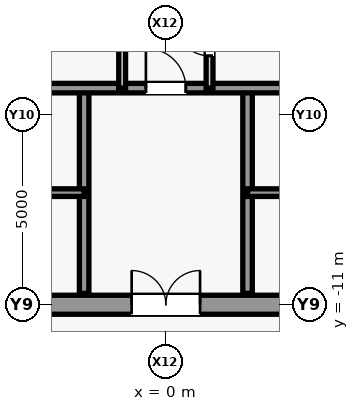
"""IFC4 building model, lengths in metres.
Left out: names, types, materials, properties, quantities, classifications, styles, units other than length and angle.
Written with IfcOpenShell. Run it as: python <this file> out.ifc"""

import sys

from ifc_helpers import new_model, si_unit, direction, frame, frame_2d, origin, place, context, subcontext, project, spatial, rectangle, extrude, source, transform, mapped, element, fill, save


model = new_model("IFC4")
c1 = context("Model", 3, precision=1e-05, world=origin(), true_north=direction((0.0, 1.0)))
c2 = subcontext(c1, "Body", "Model", "MODEL_VIEW")
j1 = project(units=[si_unit("LENGTHUNIT", "METRE"), si_unit("PLANEANGLEUNIT", "RADIAN")], contexts=[c1])
p1 = place(None, origin())
s1 = spatial("IfcSite", under=j1, at=p1, CompositionType="ELEMENT")
p2 = place(p1, origin())
s2 = spatial("IfcBuilding", under=s1, at=p2, CompositionType="ELEMENT")
p3 = place(p2, frame((0.0, 0.0, -4.8)))
s3 = spatial("IfcBuildingStorey", under=s2, at=p3, CompositionType="ELEMENT", Elevation=-4.8)
m1 = source(origin(), c2, "Body", "SweptSolid", [
    extrude(rectangle(XDim=9.2, YDim=0.5, at=frame_2d((4.6, 0.0))), origin(), (0.0, 0.0, 1.0), 4.48),
])
p4 = place(p3, frame((-4.6, -11.0, 0.0), z_axis=(0.0, 0.0, 1.0), x_axis=(1.0, 0.0, 0.0)))
e1 = element("IfcWall", 1, at=p4, inside=s3, PredefinedType="SHEAR", context=c2, shape_type="MappedRepresentation", body=[
    mapped(m1, transform((0.0, 0.0, 0.0), scale=1.0)),
])
m2 = source(origin(), c2, "Body", "SweptSolid", [
    extrude(rectangle(XDim=1.8, YDim=2.25, at=frame_2d((0.9, 1.125))), frame((0.0, 0.26, 0.0), z_axis=(0.0, -1.0, 0.0), x_axis=(1.0, 0.0, 0.0)), (0.0, 0.0, 1.0), 0.52),
])
p5 = place(p4, frame((3.7, 0.0, 0.0)))
e2 = element("IfcOpeningElement", 2, at=p5, cuts=e1, PredefinedType="OPENING", context=c2, shape_type="MappedRepresentation", body=[
    mapped(m2, transform((0.0, 0.0, 0.0), scale=1.0)),
])
m3 = source(origin(), c2, "Body", "SweptSolid", [
    extrude(rectangle(XDim=5.4, YDim=0.25, at=frame_2d((2.7, 0.0))), origin(), (0.0, 0.0, 1.0), 4.48),
])
for number, where, z_axis, x_axis in (
    (3, (-2.15, -10.7, 0.0), (0.0, 0.0, 1.0), (0.0, 1.0, 0.0)),
    (4, (2.15, -10.7, 0.0), (0.0, 0.0, 1.0), (0.0, 1.0, 0.0)),
):
    element("IfcWall", number, at=place(p3, frame(where, z_axis=z_axis, x_axis=x_axis)), inside=s3, PredefinedType="SHEAR", context=c2, shape_type="MappedRepresentation", body=[
        mapped(m3, transform((0.0, 0.0, 0.0), scale=1.0)),
    ])
m4 = source(origin(), c2, "Body", "SweptSolid", [
    extrude(rectangle(XDim=2.45, YDim=0.2, at=frame_2d((1.225, 0.0))), origin(), (0.0, 0.0, 1.0), 4.48),
])
for number, where, z_axis, x_axis in (
    (5, (-4.6, -8.05, 0.0), (0.0, 0.0, 1.0), (1.0, 0.0, 0.0)),
    (6, (2.15, -8.05, 0.0), (0.0, 0.0, 1.0), (1.0, 0.0, 0.0)),
):
    element("IfcWall", number, at=place(p3, frame(where, z_axis=z_axis, x_axis=x_axis)), inside=s3, PredefinedType="SHEAR", context=c2, shape_type="MappedRepresentation", body=[
        mapped(m4, transform((0.0, 0.0, 0.0), scale=1.0)),
    ])
m5 = source(origin(), c2, "Body", "SweptSolid", [
    extrude(rectangle(XDim=9.2, YDim=0.25, at=frame_2d((4.6, 0.0))), origin(), (0.0, 0.0, 1.0), 4.48),
])
p6 = place(p3, frame((-4.6, -5.3, 0.0), z_axis=(0.0, 0.0, 1.0), x_axis=(1.0, 0.0, 0.0)))
e7 = element("IfcWall", 7, at=p6, inside=s3, PredefinedType="SHEAR", context=c2, shape_type="MappedRepresentation", body=[
    mapped(m5, transform((0.0, 0.0, 0.0), scale=1.0)),
])
m6 = source(origin(), c2, "Body", "SweptSolid", [
    extrude(rectangle(XDim=1.05, YDim=2.2, at=frame_2d((0.525, 1.1))), frame((0.0, 0.135, 0.0), z_axis=(0.0, -1.0, 0.0), x_axis=(1.0, 0.0, 0.0)), (0.0, 0.0, 1.0), 0.27),
])
p7 = place(p6, frame((4.075, 0.0, 0.0)))
e8 = element("IfcOpeningElement", 8, at=p7, cuts=e7, PredefinedType="OPENING", context=c2, shape_type="MappedRepresentation", body=[
    mapped(m6, transform((0.0, 0.0, 0.0), scale=1.0)),
])
m7 = source(origin(), c2, "Body", "SweptSolid", [
    extrude(rectangle(XDim=10.6, YDim=0.18, at=frame_2d((5.3, 0.0))), origin(), (0.0, 0.0, 1.0), 4.48),
])
p8 = place(p3, frame((-1.15, -5.3, 0.0), z_axis=(0.0, 0.0, 1.0), x_axis=(0.0, 1.0, 0.0)))
e9 = element("IfcWall", 9, at=p8, inside=s3, PredefinedType="PARTITIONING", context=c2, shape_type="MappedRepresentation", body=[
    mapped(m7, transform((0.0, 0.0, 0.0), scale=1.0)),
])
m8 = source(origin(), c2, "Body", "SweptSolid", [
    extrude(rectangle(XDim=0.9, YDim=2.15, at=frame_2d((0.45, 1.075))), frame((0.0, 0.1, 0.0), z_axis=(0.0, -1.0, 0.0), x_axis=(1.0, 0.0, 0.0)), (0.0, 0.0, 1.0), 0.2),
])
p9 = place(p8, frame((1.9, 0.0, 0.0)))
e10 = element("IfcOpeningElement", 10, at=p9, cuts=e9, PredefinedType="OPENING", context=c2, shape_type="MappedRepresentation", body=[
    mapped(m8, transform((0.0, 0.0, 0.0), scale=1.0)),
])
p10 = place(p8, frame((6.55, 0.0, 0.0)))
e11 = element("IfcOpeningElement", 11, at=p10, cuts=e9, PredefinedType="OPENING", context=c2, shape_type="MappedRepresentation", body=[
    mapped(m8, transform((0.0, 0.0, 0.0), scale=1.0)),
])
p11 = place(p8, frame((9.475, 0.0, 0.0)))
e12 = element("IfcOpeningElement", 12, at=p11, cuts=e9, PredefinedType="OPENING", context=c2, shape_type="MappedRepresentation", body=[
    mapped(m8, transform((0.0, 0.0, 0.0), scale=1.0)),
])
p12 = place(p3, frame((1.15, -5.3, 0.0), z_axis=(0.0, 0.0, 1.0), x_axis=(0.0, 1.0, 0.0)))
e13 = element("IfcWall", 13, at=p12, inside=s3, PredefinedType="PARTITIONING", context=c2, shape_type="MappedRepresentation", body=[
    mapped(m7, transform((0.0, 0.0, 0.0), scale=1.0)),
])
p13 = place(p12, frame((0.85, 0.0, 0.0)))
e14 = element("IfcOpeningElement", 14, at=p13, cuts=e13, PredefinedType="OPENING", context=c2, shape_type="MappedRepresentation", body=[
    mapped(m8, transform((0.0, 0.0, 0.0), scale=1.0)),
])
p14 = place(p12, frame((3.55, 0.0, 0.0)))
e15 = element("IfcOpeningElement", 15, at=p14, cuts=e13, PredefinedType="OPENING", context=c2, shape_type="MappedRepresentation", body=[
    mapped(m8, transform((0.0, 0.0, 0.0), scale=1.0)),
])
p15 = place(p12, frame((6.3, 0.0, 0.0)))
e16 = element("IfcOpeningElement", 16, at=p15, cuts=e13, PredefinedType="OPENING", context=c2, shape_type="MappedRepresentation", body=[
    mapped(m8, transform((0.0, 0.0, 0.0), scale=1.0)),
])
p16 = place(p12, frame((8.25, 0.0, 0.0)))
e17 = element("IfcOpeningElement", 17, at=p16, cuts=e13, PredefinedType="OPENING", context=c2, shape_type="MappedRepresentation", body=[
    mapped(m8, transform((0.0, 0.0, 0.0), scale=1.0)),
])
p17 = place(p12, frame((9.475, 0.0, 0.0)))
e18 = element("IfcOpeningElement", 18, at=p17, cuts=e13, PredefinedType="OPENING", context=c2, shape_type="MappedRepresentation", body=[
    mapped(m8, transform((0.0, 0.0, 0.0), scale=1.0)),
])
m9 = source(origin(), c2, "Body", "SweptSolid", [
    extrude(rectangle(XDim=1.05, YDim=2.2, at=frame_2d((0.525, 1.1))), frame((0.0, 0.025, 0.0), z_axis=(0.0, -1.0, 0.0), x_axis=(1.0, 0.0, 0.0)), (0.0, 0.0, 1.0), 0.05),
])
p18 = place(p7, origin())
e19 = element("IfcDoor", 19, at=p18, inside=s3, OperationType="SINGLE_SWING_LEFT", PredefinedType="DOOR", context=c2, shape_type="MappedRepresentation", body=[
    mapped(m9, transform((0.0, 0.0, 0.0), scale=1.0)),
])
fill(e8, e19)
m10 = source(origin(), c2, "Body", "SweptSolid", [
    extrude(rectangle(XDim=1.8, YDim=2.25, at=frame_2d((0.9, 1.125))), frame((0.0, 0.025, 0.0), z_axis=(0.0, -1.0, 0.0), x_axis=(1.0, 0.0, 0.0)), (0.0, 0.0, 1.0), 0.05),
])
p19 = place(p5, origin())
e20 = element("IfcDoor", 20, at=p19, inside=s3, OperationType="SINGLE_SWING_LEFT", PredefinedType="DOOR", context=c2, shape_type="MappedRepresentation", body=[
    mapped(m10, transform((0.0, 0.0, 0.0), scale=1.0)),
])
fill(e2, e20)
m11 = source(origin(), c2, "Body", "SweptSolid", [
    extrude(rectangle(XDim=0.9, YDim=2.15, at=frame_2d((0.45, 1.075))), frame((0.0, 0.025, 0.0), z_axis=(0.0, -1.0, 0.0), x_axis=(1.0, 0.0, 0.0)), (0.0, 0.0, 1.0), 0.05),
])
p20 = place(p13, origin())
e21 = element("IfcDoor", 21, at=p20, inside=s3, OperationType="SINGLE_SWING_RIGHT", PredefinedType="DOOR", context=c2, shape_type="MappedRepresentation", body=[
    mapped(m11, transform((0.0, 0.0, 0.0), scale=1.0)),
])
fill(e14, e21)
save(model, sys.argv[1])
